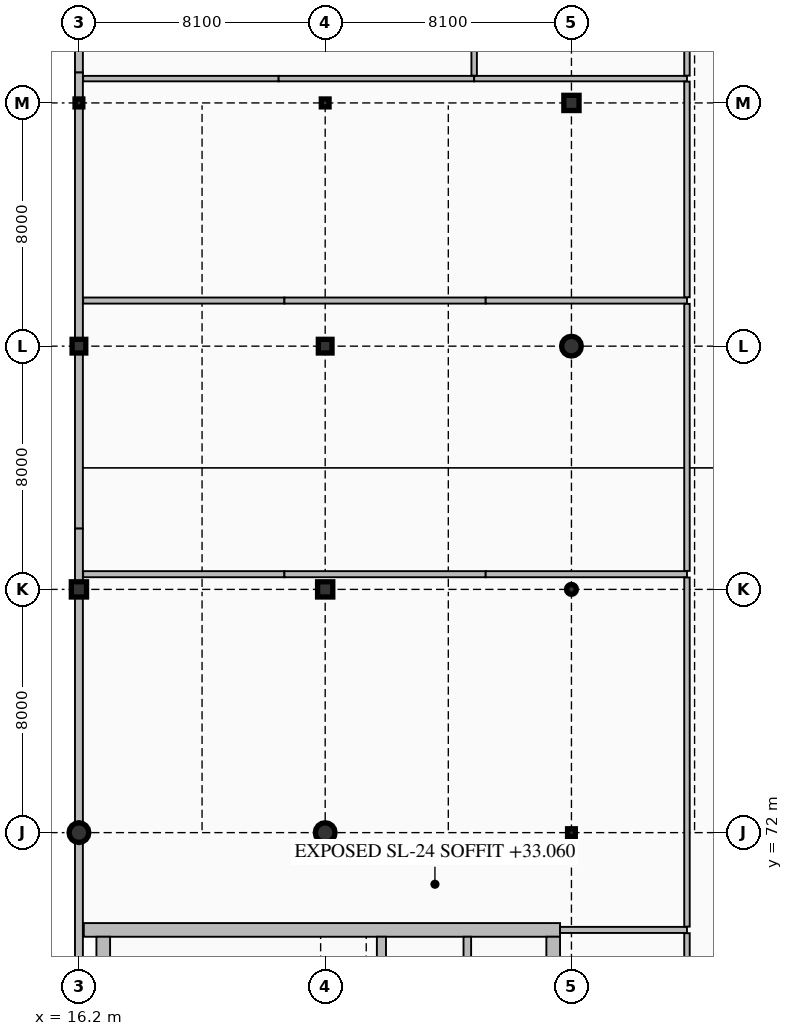
"""IFC4 building model, lengths in metres.
Left out: names, types, materials, properties, quantities, classifications, styles, units other than length and angle.
Written with IfcOpenShell. Run it as: python <this file> out.ifc"""

import sys

from ifc_helpers import new_model, si_unit, direction, frame, frame_2d, origin, origin_2d, place, context, subcontext, project, spatial, rectangle, hollow_rectangle, circle, hollow_circle, i_section, extrude, element, fill, save


model = new_model("IFC4")
c1 = context("Model", 3, precision=1e-05, world=origin(), true_north=direction((0.0, 1.0)))
c2 = subcontext(c1, "Body", "Model", "MODEL_VIEW")
j1 = project(units=[si_unit("LENGTHUNIT", "METRE"), si_unit("PLANEANGLEUNIT", "RADIAN")], contexts=[c1])
p1 = place(None, origin())
s1 = spatial("IfcSite", under=j1, at=p1, CompositionType="ELEMENT")
p2 = place(p1, origin())
s2 = spatial("IfcBuilding", under=s1, at=p2, CompositionType="ELEMENT")
p3 = place(p2, frame((0.0, 0.0, 29.1)))
s3 = spatial("IfcBuildingStorey", under=s2, at=p3, CompositionType="ELEMENT", Elevation=29.1)
p4 = place(p3, frame((16.36, 68.8, 0.0), z_axis=(0.0, 0.0, 1.0), x_axis=(1.0, 0.0, 0.0)))
e1 = element("IfcWall", 1, at=p4, inside=s3, PredefinedType="SHEAR", context=c2, shape_type="SweptSolid", body=[
    extrude(rectangle(XDim=15.665, YDim=0.45, at=frame_2d((7.833, 0.0))), origin(), (0.0, 0.0, 1.0), 4.2),
])
for number, where, z_axis, x_axis in (
    (2, (17.0, 60.625, 0.0), (0.0, 0.0, 1.0), (0.0, 1.0, 0.0)),
    (3, (31.8, 60.625, 0.0), (0.0, 0.0, 1.0), (0.0, 1.0, 0.0)),
):
    element("IfcWall", number, at=place(p3, frame(where, z_axis=z_axis, x_axis=x_axis)), inside=s3, PredefinedType="SHEAR", context=c2, shape_type="SweptSolid", body=[
        extrude(rectangle(XDim=7.95, YDim=0.45, at=frame_2d((3.975, 0.0))), origin(), (0.0, 0.0, 1.0), 4.2),
    ])
p5 = place(p3, frame((26.15, 60.625, 0.0), z_axis=(0.0, 0.0, 1.0), x_axis=(0.0, 1.0, 0.0)))
e4 = element("IfcWall", 4, at=p5, inside=s3, PredefinedType="SHEAR", context=c2, shape_type="SweptSolid", body=[
    extrude(rectangle(XDim=7.95, YDim=0.3, at=frame_2d((3.975, 0.0))), origin(), (0.0, 0.0, 1.0), 4.2),
])
p6 = place(p3, frame((28.975, 60.625, 0.0), z_axis=(0.0, 0.0, 1.0), x_axis=(0.0, 1.0, 0.0)))
e5 = element("IfcWall", 5, at=p6, inside=s3, PredefinedType="SHEAR", context=c2, shape_type="SweptSolid", body=[
    extrude(rectangle(XDim=7.95, YDim=0.25, at=frame_2d((3.975, 0.0))), origin(), (0.0, 0.0, 1.0), 4.2),
])
p7 = place(p3, frame((16.2, 72.0, 0.0), z_axis=(0.0, 0.0, 1.0), x_axis=(1.0, 0.0, 0.0)))
e6 = element("IfcColumn", 6, at=p7, inside=s3, PredefinedType="COLUMN", context=c2, shape_type="SweptSolid", body=[
    extrude(circle(Radius=0.325, at=origin_2d()), origin(), (0.0, 0.0, 1.0), 4.2),
])
p8 = place(p3, frame((16.2, 80.0, 0.0), z_axis=(0.0, 0.0, 1.0), x_axis=(1.0, 0.0, 0.0)))
e7 = element("IfcColumn", 7, at=p8, inside=s3, PredefinedType="COLUMN", context=c2, shape_type="SweptSolid", body=[
    extrude(rectangle(XDim=0.5, YDim=0.5, at=origin_2d()), origin(), (0.0, 0.0, 1.0), 4.2),
])
p9 = place(p3, frame((16.2, 88.0, 0.0), z_axis=(0.0, 0.0, 1.0), x_axis=(1.0, 0.0, 0.0)))
e8 = element("IfcColumn", 8, at=p9, inside=s3, PredefinedType="COLUMN", context=c2, shape_type="SweptSolid", body=[
    extrude(rectangle(XDim=0.45, YDim=0.45, at=origin_2d()), origin(), (0.0, 0.0, 1.0), 4.2),
])
p10 = place(p3, frame((16.2, 96.0, 0.0), z_axis=(0.0, 0.0, 1.0), x_axis=(1.0, 0.0, 0.0)))
e9 = element("IfcColumn", 9, at=p10, inside=s3, PredefinedType="COLUMN", context=c2, shape_type="SweptSolid", body=[
    extrude(i_section(OverallWidth=0.256, OverallDepth=0.26, WebThickness=0.011, FlangeThickness=0.017, FilletRadius=0.013, at=origin_2d()), origin(), (0.0, 0.0, 1.0), 4.2),
])
p11 = place(p3, frame((24.3, 72.0, 0.0), z_axis=(0.0, 0.0, 1.0), x_axis=(1.0, 0.0, 0.0)))
e10 = element("IfcColumn", 10, at=p11, inside=s3, PredefinedType="COLUMN", context=c2, shape_type="SweptSolid", body=[
    extrude(circle(Radius=0.325, at=origin_2d()), origin(), (0.0, 0.0, 1.0), 4.2),
])
p12 = place(p3, frame((24.3, 80.0, 0.0), z_axis=(0.0, 0.0, 1.0), x_axis=(1.0, 0.0, 0.0)))
e11 = element("IfcColumn", 11, at=p12, inside=s3, PredefinedType="COLUMN", context=c2, shape_type="SweptSolid", body=[
    extrude(rectangle(XDim=0.5, YDim=0.5, at=origin_2d()), origin(), (0.0, 0.0, 1.0), 4.2),
])
p13 = place(p3, frame((24.3, 88.0, 0.0), z_axis=(0.0, 0.0, 1.0), x_axis=(1.0, 0.0, 0.0)))
e12 = element("IfcColumn", 12, at=p13, inside=s3, PredefinedType="COLUMN", context=c2, shape_type="SweptSolid", body=[
    extrude(rectangle(XDim=0.45, YDim=0.45, at=origin_2d()), origin(), (0.0, 0.0, 1.0), 4.2),
])
p14 = place(p3, frame((24.3, 96.0, 0.0), z_axis=(0.0, 0.0, 1.0), x_axis=(1.0, 0.0, 0.0)))
e13 = element("IfcColumn", 13, at=p14, inside=s3, PredefinedType="COLUMN", context=c2, shape_type="SweptSolid", body=[
    extrude(i_section(OverallWidth=0.256, OverallDepth=0.26, WebThickness=0.011, FlangeThickness=0.017, FilletRadius=0.013, at=origin_2d()), origin(), (0.0, 0.0, 1.0), 4.2),
])
p15 = place(p3, frame((32.4, 72.0, 0.0), z_axis=(0.0, 0.0, 1.0), x_axis=(1.0, 0.0, 0.0)))
e14 = element("IfcColumn", 14, at=p15, inside=s3, PredefinedType="COLUMN", context=c2, shape_type="SweptSolid", body=[
    extrude(hollow_rectangle(XDim=0.254, YDim=0.254, WallThickness=0.013, InnerFilletRadius=0.013, OuterFilletRadius=0.025, at=origin_2d()), origin(), (0.0, 0.0, 1.0), 4.2),
])
p16 = place(p3, frame((32.4, 80.0, 0.0), z_axis=(0.0, 0.0, 1.0), x_axis=(1.0, 0.0, 0.0)))
e15 = element("IfcColumn", 15, at=p16, inside=s3, PredefinedType="COLUMN", context=c2, shape_type="SweptSolid", body=[
    extrude(hollow_circle(Radius=0.162, WallThickness=0.013, at=origin_2d()), origin(), (0.0, 0.0, 1.0), 4.2),
])
p17 = place(p3, frame((32.4, 88.0, 0.0), z_axis=(0.0, 0.0, 1.0), x_axis=(1.0, 0.0, 0.0)))
e16 = element("IfcColumn", 16, at=p17, inside=s3, PredefinedType="COLUMN", context=c2, shape_type="SweptSolid", body=[
    extrude(circle(Radius=0.325, at=origin_2d()), origin(), (0.0, 0.0, 1.0), 4.2),
])
p18 = place(p3, frame((32.4, 96.0, 0.0), z_axis=(0.0, 0.0, 1.0), x_axis=(1.0, 0.0, 0.0)))
e17 = element("IfcColumn", 17, at=p18, inside=s3, PredefinedType="COLUMN", context=c2, shape_type="SweptSolid", body=[
    extrude(rectangle(XDim=0.5, YDim=0.5, at=origin_2d()), origin(), (0.0, 0.0, 1.0), 4.2),
])
for number, where, z_axis, x_axis in (
    (18, (16.2, 112.0, 0.0), (0.0, 0.0, 1.0), (0.0, -1.0, 0.0)),
    (19, (16.2, 97.0, 0.0), (0.0, 0.0, 1.0), (0.0, -1.0, 0.0)),
    (20, (16.2, 82.0, 0.0), (0.0, 0.0, 1.0), (0.0, -1.0, 0.0)),
):
    element("IfcWall", number, at=place(p3, frame(where, z_axis=z_axis, x_axis=x_axis)), inside=s3, PredefinedType="SOLIDWALL", context=c2, shape_type="SweptSolid", body=[
        extrude(rectangle(XDim=15.0, YDim=0.26, at=frame_2d((7.5, 0.0))), origin(), (0.0, 0.0, 1.0), 3.452),
    ])
p19 = place(p3, frame((16.338, 80.5, 0.0), z_axis=(0.0, 0.0, 1.0), x_axis=(1.0, 0.0, 0.0)))
e21 = element("IfcWall", 21, at=p19, inside=s3, PredefinedType="PARTITIONING", context=c2, shape_type="SweptSolid", body=[
    extrude(rectangle(XDim=6.621, YDim=0.2, at=frame_2d((3.311, 0.0))), origin(), (0.0, 0.0, 1.0), 3.96),
])
for number, where, z_axis, x_axis in (
    (22, (22.959, 80.5, 0.0), (0.0, 0.0, 1.0), (1.0, 0.0, 0.0)),
    (23, (29.579, 80.5, 0.0), (0.0, 0.0, 1.0), (1.0, 0.0, 0.0)),
):
    element("IfcWall", number, at=place(p3, frame(where, z_axis=z_axis, x_axis=x_axis)), inside=s3, PredefinedType="PARTITIONING", context=c2, shape_type="SweptSolid", body=[
        extrude(rectangle(XDim=6.621, YDim=0.2, at=frame_2d((3.31, 0.0))), origin(), (0.0, 0.0, 1.0), 3.96),
    ])
p20 = place(p3, frame((16.338, 89.5, 0.0), z_axis=(0.0, 0.0, 1.0), x_axis=(1.0, 0.0, 0.0)))
e24 = element("IfcWall", 24, at=p20, inside=s3, PredefinedType="PARTITIONING", context=c2, shape_type="SweptSolid", body=[
    extrude(rectangle(XDim=6.621, YDim=0.2, at=frame_2d((3.311, 0.0))), origin(), (0.0, 0.0, 1.0), 3.96),
])
for number, where, z_axis, x_axis in (
    (25, (22.959, 89.5, 0.0), (0.0, 0.0, 1.0), (1.0, 0.0, 0.0)),
    (26, (29.579, 89.5, 0.0), (0.0, 0.0, 1.0), (1.0, 0.0, 0.0)),
):
    element("IfcWall", number, at=place(p3, frame(where, z_axis=z_axis, x_axis=x_axis)), inside=s3, PredefinedType="PARTITIONING", context=c2, shape_type="SweptSolid", body=[
        extrude(rectangle(XDim=6.621, YDim=0.2, at=frame_2d((3.31, 0.0))), origin(), (0.0, 0.0, 1.0), 3.96),
    ])
p21 = place(p3, frame((16.338, 96.8, 0.0), z_axis=(0.0, 0.0, 1.0), x_axis=(1.0, 0.0, 0.0)))
e27 = element("IfcWall", 27, at=p21, inside=s3, PredefinedType="PARTITIONING", context=c2, shape_type="SweptSolid", body=[
    extrude(rectangle(XDim=6.431, YDim=0.18, at=frame_2d((3.216, 0.0))), origin(), (0.0, 0.0, 1.0), 3.96),
])
p22 = place(p3, frame((22.769, 96.8, 0.0), z_axis=(0.0, 0.0, 1.0), x_axis=(1.0, 0.0, 0.0)))
e28 = element("IfcWall", 28, at=p22, inside=s3, PredefinedType="PARTITIONING", context=c2, shape_type="SweptSolid", body=[
    extrude(rectangle(XDim=6.431, YDim=0.18, at=frame_2d((3.215, 0.0))), origin(), (0.0, 0.0, 1.0), 3.96),
])
p23 = place(p3, frame((29.2, 96.8, 0.0), z_axis=(0.0, 0.0, 1.0), x_axis=(1.0, 0.0, 0.0)))
e29 = element("IfcWall", 29, at=p23, inside=s3, PredefinedType="PARTITIONING", context=c2, shape_type="SweptSolid", body=[
    extrude(rectangle(XDim=7.0, YDim=0.18, at=frame_2d((3.5, 0.0))), origin(), (0.0, 0.0, 1.0), 3.96),
])
p24 = place(p3, frame((32.025, 68.8, 0.0), z_axis=(0.0, 0.0, 1.0), x_axis=(1.0, 0.0, 0.0)))
e30 = element("IfcWall", 30, at=p24, inside=s3, PredefinedType="PARTITIONING", context=c2, shape_type="SweptSolid", body=[
    extrude(rectangle(XDim=4.175, YDim=0.2, at=frame_2d((2.087, 0.0))), origin(), (0.0, 0.0, 1.0), 3.96),
])
p25 = place(p3, frame((29.2, 96.898, 0.0), z_axis=(0.0, 0.0, 1.0), x_axis=(0.0, 1.0, 0.0)))
e31 = element("IfcWall", 31, at=p25, inside=s3, PredefinedType="PARTITIONING", context=c2, shape_type="SweptSolid", body=[
    extrude(rectangle(XDim=3.269, YDim=0.18, at=frame_2d((1.635, 0.0))), origin(), (0.0, 0.0, 1.0), 3.96),
])
p26 = place(p25, frame((1.034, 0.0, 0.0)))
e32 = element("IfcOpeningElement", 32, at=p26, cuts=e31, PredefinedType="OPENING", context=c2, shape_type="SweptSolid", body=[
    extrude(rectangle(XDim=1.2, YDim=2.2, at=frame_2d((0.6, 1.1))), frame((0.0, 0.1, 0.0), z_axis=(0.0, -1.0, 0.0), x_axis=(1.0, 0.0, 0.0)), (0.0, 0.0, 1.0), 0.2),
])
p27 = place(p3, frame((36.2, 66.088, 0.0), z_axis=(0.0, 0.0, 1.0), x_axis=(0.0, 1.0, 0.0)))
e33 = element("IfcWall", 33, at=p27, inside=s3, PredefinedType="PARTITIONING", context=c2, shape_type="SweptSolid", body=[
    extrude(rectangle(XDim=2.604, YDim=0.18, at=frame_2d((1.302, 0.0))), origin(), (0.0, 0.0, 1.0), 3.96),
])
p28 = place(p27, frame((0.802, 0.0, 0.0)))
e34 = element("IfcOpeningElement", 34, at=p28, cuts=e33, PredefinedType="OPENING", context=c2, shape_type="SweptSolid", body=[
    extrude(rectangle(XDim=1.0, YDim=2.15, at=frame_2d((0.5, 1.075))), frame((0.0, 0.1, 0.0), z_axis=(0.0, -1.0, 0.0), x_axis=(1.0, 0.0, 0.0)), (0.0, 0.0, 1.0), 0.2),
])
p29 = place(p3, frame((36.2, 68.908, 0.0), z_axis=(0.0, 0.0, 1.0), x_axis=(0.0, 1.0, 0.0)))
e35 = element("IfcWall", 35, at=p29, inside=s3, PredefinedType="PARTITIONING", context=c2, shape_type="SweptSolid", body=[
    extrude(rectangle(XDim=11.484, YDim=0.18, at=frame_2d((5.742, 0.0))), origin(), (0.0, 0.0, 1.0), 3.598),
])
p30 = place(p29, frame((5.192, 0.0, 0.0)))
e36 = element("IfcOpeningElement", 36, at=p30, cuts=e35, PredefinedType="OPENING", context=c2, shape_type="SweptSolid", body=[
    extrude(rectangle(XDim=1.1, YDim=2.2, at=frame_2d((0.55, 1.1))), frame((0.0, 0.1, 0.0), z_axis=(0.0, -1.0, 0.0), x_axis=(1.0, 0.0, 0.0)), (0.0, 0.0, 1.0), 0.2),
])
p31 = place(p3, frame((36.2, 80.608, 0.0), z_axis=(0.0, 0.0, 1.0), x_axis=(0.0, 1.0, 0.0)))
e37 = element("IfcWall", 37, at=p31, inside=s3, PredefinedType="PARTITIONING", context=c2, shape_type="SweptSolid", body=[
    extrude(rectangle(XDim=8.784, YDim=0.18, at=frame_2d((4.392, 0.0))), origin(), (0.0, 0.0, 1.0), 3.545),
])
p32 = place(p31, frame((3.892, 0.0, 0.0)))
e38 = element("IfcOpeningElement", 38, at=p32, cuts=e37, PredefinedType="OPENING", context=c2, shape_type="SweptSolid", body=[
    extrude(rectangle(XDim=1.0, YDim=2.2, at=frame_2d((0.5, 1.1))), frame((0.0, 0.1, 0.0), z_axis=(0.0, -1.0, 0.0), x_axis=(1.0, 0.0, 0.0)), (0.0, 0.0, 1.0), 0.2),
])
p33 = place(p3, frame((36.2, 89.608, 0.0), z_axis=(0.0, 0.0, 1.0), x_axis=(0.0, 1.0, 0.0)))
e39 = element("IfcWall", 39, at=p33, inside=s3, PredefinedType="PARTITIONING", context=c2, shape_type="SweptSolid", body=[
    extrude(rectangle(XDim=7.094, YDim=0.18, at=frame_2d((3.547, 0.0))), origin(), (0.0, 0.0, 1.0), 3.545),
])
p34 = place(p33, frame((3.047, 0.0, 0.0)))
e40 = element("IfcOpeningElement", 40, at=p34, cuts=e39, PredefinedType="OPENING", context=c2, shape_type="SweptSolid", body=[
    extrude(rectangle(XDim=1.0, YDim=2.2, at=frame_2d((0.5, 1.1))), frame((0.0, 0.1, 0.0), z_axis=(0.0, -1.0, 0.0), x_axis=(1.0, 0.0, 0.0)), (0.0, 0.0, 1.0), 0.2),
])
p35 = place(p3, frame((36.2, 96.898, 0.0), z_axis=(0.0, 0.0, 1.0), x_axis=(0.0, 1.0, 0.0)))
e41 = element("IfcWall", 41, at=p35, inside=s3, PredefinedType="PARTITIONING", context=c2, shape_type="SweptSolid", body=[
    extrude(rectangle(XDim=3.404, YDim=0.18, at=frame_2d((1.702, 0.0))), origin(), (0.0, 0.0, 1.0), 3.545),
])
p36 = place(p35, frame((1.152, 0.0, 0.0)))
e42 = element("IfcOpeningElement", 42, at=p36, cuts=e41, PredefinedType="OPENING", context=c2, shape_type="SweptSolid", body=[
    extrude(rectangle(XDim=1.1, YDim=2.2, at=frame_2d((0.55, 1.1))), frame((0.0, 0.1, 0.0), z_axis=(0.0, -1.0, 0.0), x_axis=(1.0, 0.0, 0.0)), (0.0, 0.0, 1.0), 0.2),
])
p37 = place(p30, origin())
e43 = element("IfcDoor", 43, at=p37, inside=s3, OperationType="SINGLE_SWING_LEFT", PredefinedType="DOOR", context=c2, shape_type="SweptSolid", body=[
    extrude(rectangle(XDim=1.1, YDim=2.2, at=frame_2d((0.55, 1.1))), frame((0.0, 0.025, 0.0), z_axis=(0.0, -1.0, 0.0), x_axis=(1.0, 0.0, 0.0)), (0.0, 0.0, 1.0), 0.05),
])
fill(e36, e43)
p38 = place(p32, origin())
e44 = element("IfcDoor", 44, at=p38, inside=s3, OperationType="SINGLE_SWING_RIGHT", PredefinedType="DOOR", context=c2, shape_type="SweptSolid", body=[
    extrude(rectangle(XDim=1.0, YDim=2.2, at=frame_2d((0.5, 1.1))), frame((0.0, 0.025, 0.0), z_axis=(0.0, -1.0, 0.0), x_axis=(1.0, 0.0, 0.0)), (0.0, 0.0, 1.0), 0.05),
])
fill(e38, e44)
p39 = place(p34, origin())
e45 = element("IfcDoor", 45, at=p39, inside=s3, OperationType="SINGLE_SWING_LEFT", PredefinedType="DOOR", context=c2, shape_type="SweptSolid", body=[
    extrude(rectangle(XDim=1.0, YDim=2.2, at=frame_2d((0.5, 1.1))), frame((0.0, 0.025, 0.0), z_axis=(0.0, -1.0, 0.0), x_axis=(1.0, 0.0, 0.0)), (0.0, 0.0, 1.0), 0.05),
])
fill(e40, e45)
save(model, sys.argv[1])
